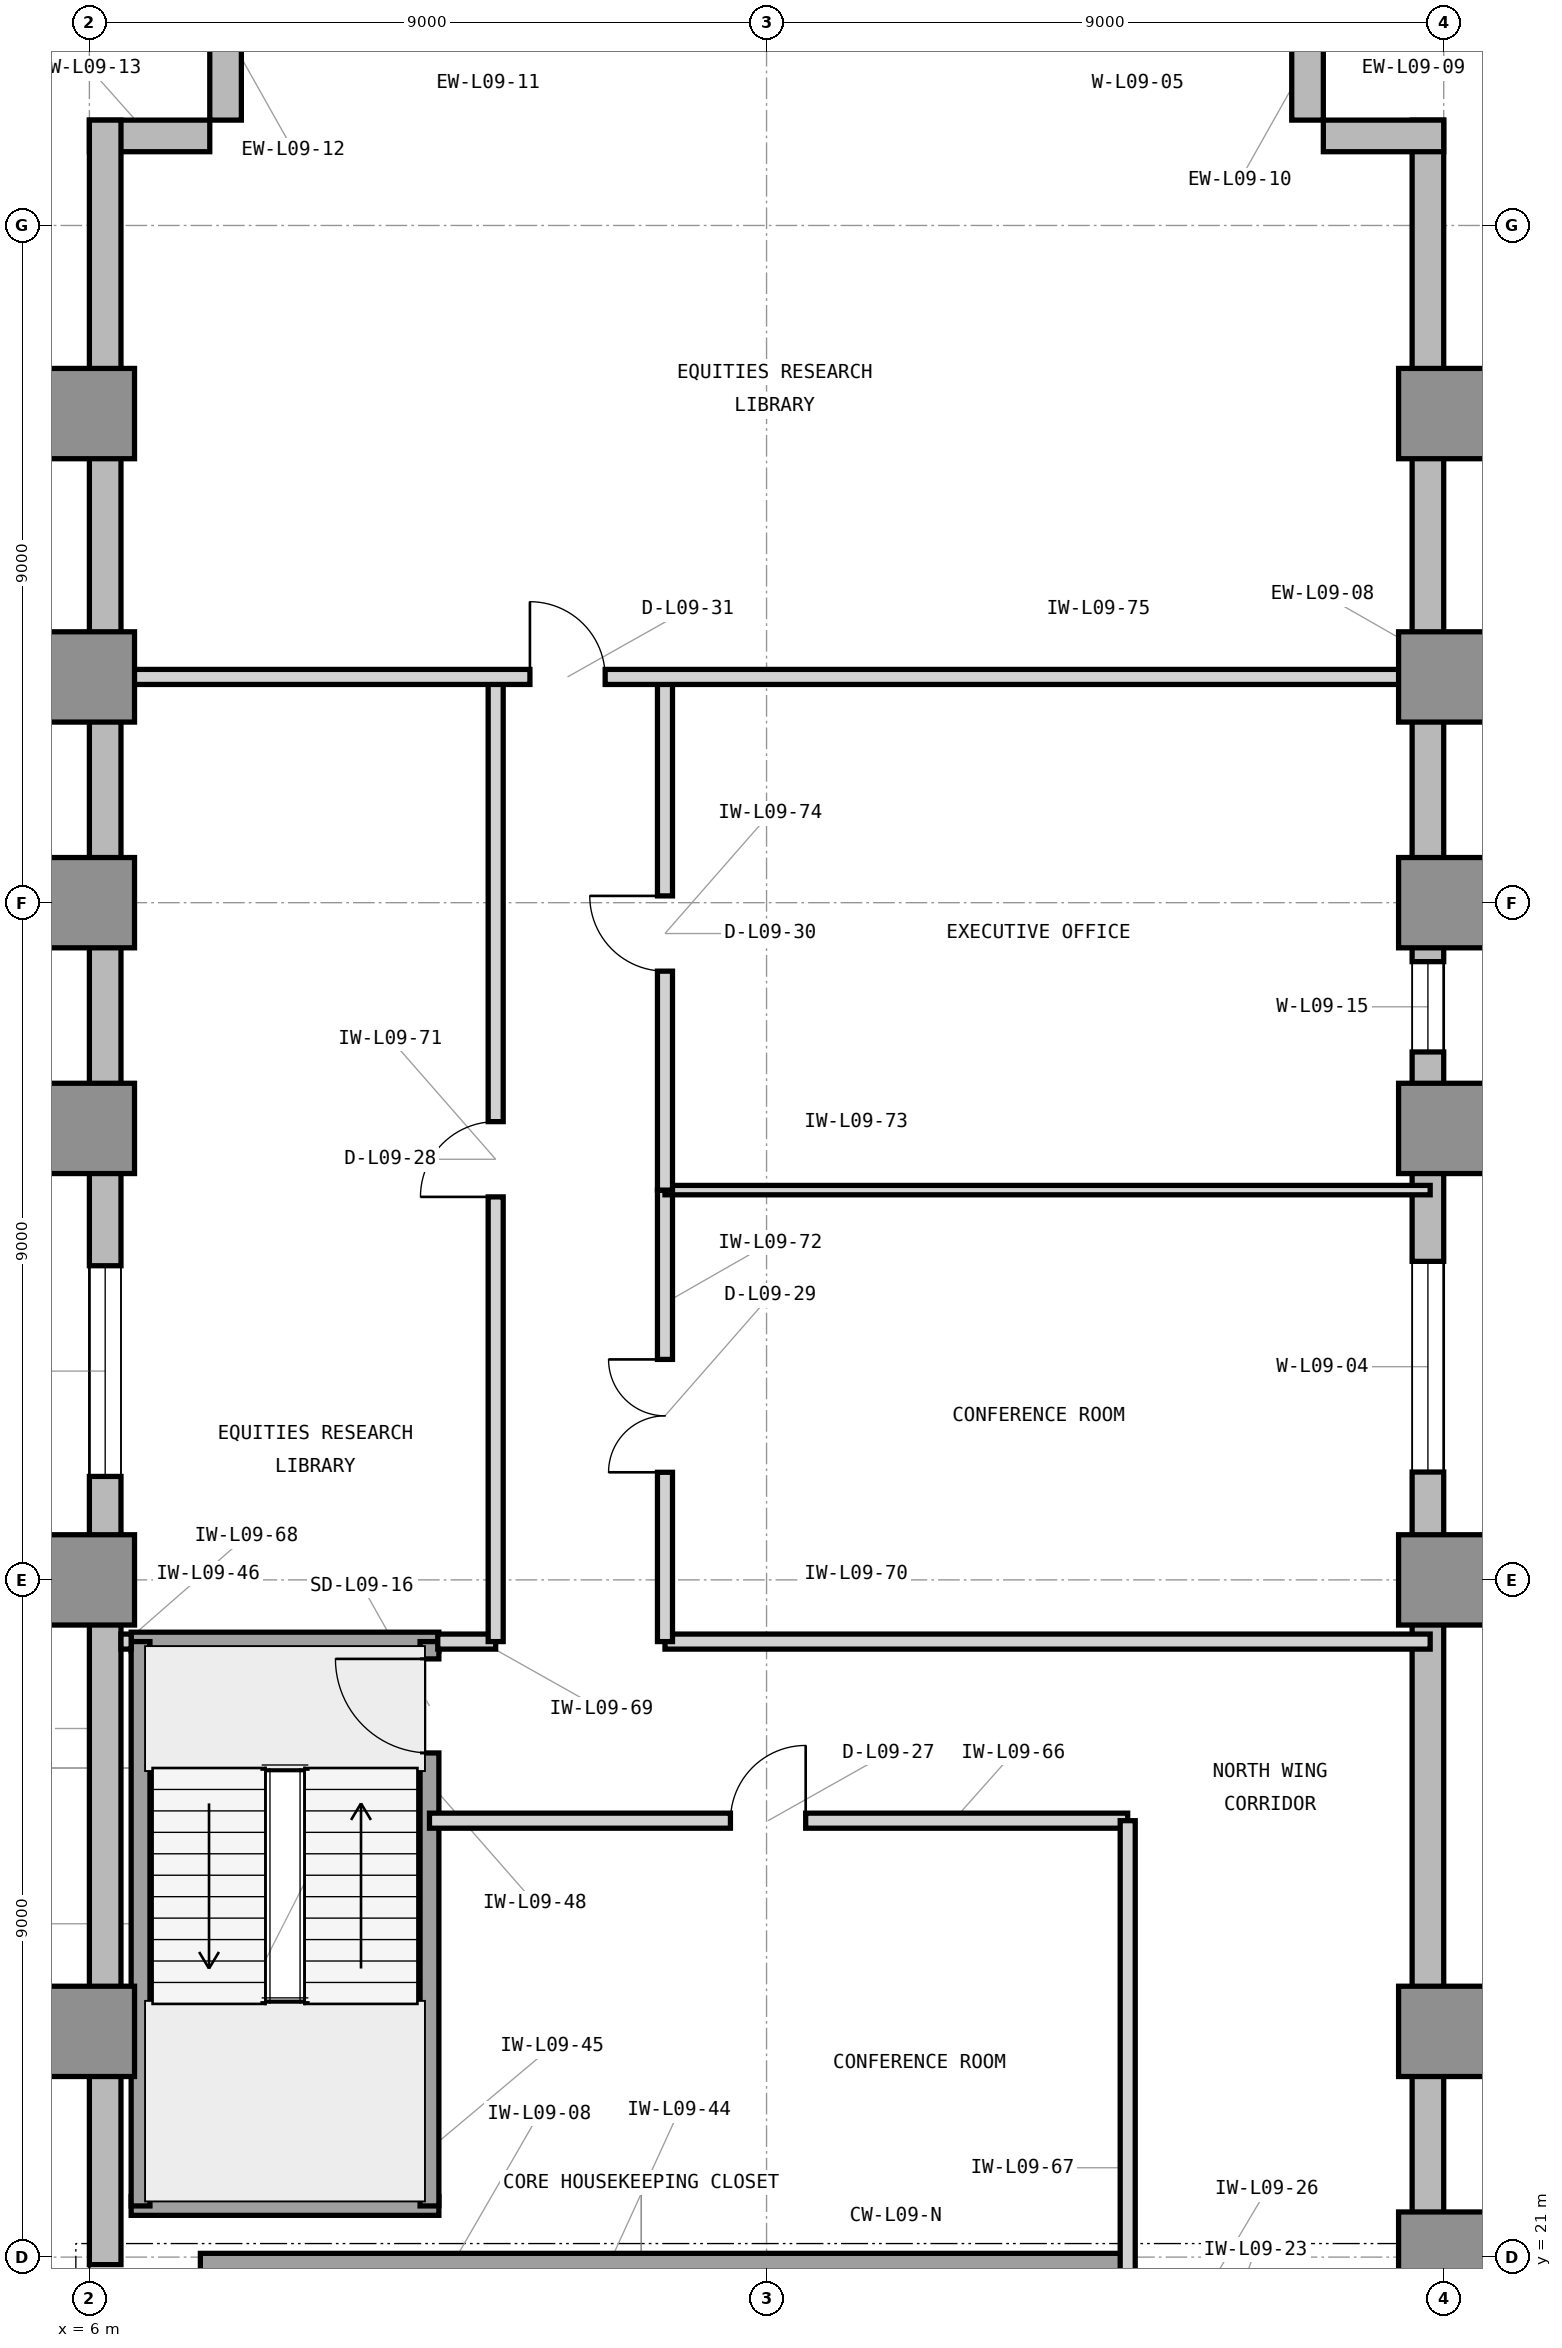
"""IFC4 building model, lengths in metres.
Left out: names, types, materials, properties, quantities, classifications, styles, units other than length and angle.
Written with IfcOpenShell. Run it as: python <this file> out.ifc"""

import sys

from ifc_helpers import new_model, si_unit, direction, frame, frame_2d, origin, origin_2d, place, context, subcontext, project, spatial, rectangle, extrude, element, fill, save


model = new_model("IFC4")
c1 = context("Model", 3, precision=1e-05, world=origin(), true_north=direction((0.0, 1.0)))
c2 = subcontext(c1, "Body", "Model", "MODEL_VIEW")
j1 = project(units=[si_unit("LENGTHUNIT", "METRE"), si_unit("PLANEANGLEUNIT", "RADIAN")], contexts=[c1])
p1 = place(None, origin())
s1 = spatial("IfcSite", under=j1, at=p1, CompositionType="ELEMENT")
p2 = place(p1, origin())
s2 = spatial("IfcBuilding", under=s1, at=p2, CompositionType="ELEMENT")
p3 = place(p2, frame((0.0, 0.0, 42.6)))
s3 = spatial("IfcBuildingStorey", under=s2, at=p3, CompositionType="ELEMENT", Elevation=42.6)
p4 = place(p3, frame((7.475, 20.65, 0.0), z_axis=(0.0, 0.0, 1.0), x_axis=(1.0, 0.0, 0.0)))
e1 = element("IfcWall", 1, at=p4, inside=s3, PredefinedType="SHEAR", context=c2, shape_type="SweptSolid", body=[
    extrude(rectangle(XDim=12.325, YDim=0.8, at=frame_2d((6.163, 0.0))), origin(), (0.0, 0.0, 1.0), 4.2),
])
for number, where, z_axis, x_axis in (
    (2, (24.0, 21.0, 0.0), (0.0, 0.0, 1.0), (1.0, 0.0, 0.0)),
    (3, (6.0, 24.0, 0.0), (0.0, 0.0, 1.0), (1.0, 0.0, 0.0)),
    (4, (24.0, 24.0, 0.0), (0.0, 0.0, 1.0), (1.0, 0.0, 0.0)),
    (5, (6.0, 30.0, 0.0), (0.0, 0.0, 1.0), (1.0, 0.0, 0.0)),
    (6, (24.0, 30.0, 0.0), (0.0, 0.0, 1.0), (1.0, 0.0, 0.0)),
    (7, (6.0, 36.0, 0.0), (0.0, 0.0, 1.0), (1.0, 0.0, 0.0)),
    (8, (24.0, 36.0, 0.0), (0.0, 0.0, 1.0), (1.0, 0.0, 0.0)),
    (9, (6.0, 39.0, 0.0), (0.0, 0.0, 1.0), (1.0, 0.0, 0.0)),
    (10, (24.0, 39.0, 0.0), (0.0, 0.0, 1.0), (1.0, 0.0, 0.0)),
    (11, (6.0, 42.0, 0.0), (0.0, 0.0, 1.0), (1.0, 0.0, 0.0)),
    (12, (24.0, 42.0, 0.0), (0.0, 0.0, 1.0), (1.0, 0.0, 0.0)),
    (13, (6.0, 45.5, 0.0), (0.0, 0.0, 1.0), (1.0, 0.0, 0.0)),
    (14, (24.0, 45.5, 0.0), (0.0, 0.0, 1.0), (1.0, 0.0, 0.0)),
):
    element("IfcColumn", number, at=place(p3, frame(where, z_axis=z_axis, x_axis=x_axis)), inside=s3, PredefinedType="COLUMN", context=c2, shape_type="SweptSolid", body=[
        extrude(rectangle(XDim=1.2, YDim=1.2, at=origin_2d()), origin(), (0.0, 0.0, 1.0), 4.2),
    ])
p5 = place(p3, frame((64.4, 20.79, 0.0), z_axis=(0.0, 0.0, 1.0), x_axis=(-1.0, 0.0, 0.0)))
e15 = element("IfcWall", 15, at=p5, inside=s3, PredefinedType="STANDARD", context=c2, shape_type="SweptSolid", body=[
    extrude(rectangle(XDim=40.4, YDim=0.42, at=frame_2d((20.2, 0.0))), origin(), (0.0, 0.0, 1.0), 3.98),
])
p6 = place(p5, frame((26.375, 0.0, 0.85)))
e16 = element("IfcOpeningElement", 16, at=p6, cuts=e15, PredefinedType="OPENING", context=c2, shape_type="SweptSolid", body=[
    extrude(rectangle(XDim=2.8, YDim=2.45, at=frame_2d((1.4, 1.225))), frame((0.0, 0.22, 0.0), z_axis=(0.0, -1.0, 0.0), x_axis=(1.0, 0.0, 0.0)), (0.0, 0.0, 1.0), 0.44),
])
p7 = place(p5, frame((38.222, 0.0, 0.85)))
e17 = element("IfcOpeningElement", 17, at=p7, cuts=e15, PredefinedType="OPENING", context=c2, shape_type="SweptSolid", body=[
    extrude(rectangle(XDim=1.2, YDim=2.45, at=frame_2d((0.6, 1.225))), frame((0.0, 0.22, 0.0), z_axis=(0.0, -1.0, 0.0), x_axis=(1.0, 0.0, 0.0)), (0.0, 0.0, 1.0), 0.44),
])
p8 = place(p5, frame((32.536, 0.0, 0.85)))
e18 = element("IfcOpeningElement", 18, at=p8, cuts=e15, PredefinedType="OPENING", context=c2, shape_type="SweptSolid", body=[
    extrude(rectangle(XDim=2.8, YDim=2.45, at=frame_2d((1.4, 1.225))), frame((0.0, 0.22, 0.0), z_axis=(0.0, -1.0, 0.0), x_axis=(1.0, 0.0, 0.0)), (0.0, 0.0, 1.0), 0.44),
])
p9 = place(p5, frame((17.386, 0.0, 0.85)))
e19 = element("IfcOpeningElement", 19, at=p9, cuts=e15, PredefinedType="OPENING", context=c2, shape_type="SweptSolid", body=[
    extrude(rectangle(XDim=2.8, YDim=2.45, at=frame_2d((1.4, 1.225))), frame((0.0, 0.22, 0.0), z_axis=(0.0, -1.0, 0.0), x_axis=(1.0, 0.0, 0.0)), (0.0, 0.0, 1.0), 0.44),
])
p10 = place(p3, frame((23.79, 21.0, 0.0), z_axis=(0.0, 0.0, 1.0), x_axis=(0.0, 1.0, 0.0)))
e20 = element("IfcWall", 20, at=p10, inside=s3, PredefinedType="STANDARD", context=c2, shape_type="SweptSolid", body=[
    extrude(rectangle(XDim=28.4, YDim=0.42, at=frame_2d((14.2, 0.0))), origin(), (0.0, 0.0, 1.0), 3.98),
])
p11 = place(p10, frame((10.433, 0.0, 0.85)))
e21 = element("IfcOpeningElement", 21, at=p11, cuts=e20, PredefinedType="OPENING", context=c2, shape_type="SweptSolid", body=[
    extrude(rectangle(XDim=2.8, YDim=2.45, at=frame_2d((1.4, 1.225))), frame((0.0, 0.22, 0.0), z_axis=(0.0, -1.0, 0.0), x_axis=(1.0, 0.0, 0.0)), (0.0, 0.0, 1.0), 0.44),
])
p12 = place(p10, frame((16.016, 0.0, 0.85)))
e22 = element("IfcOpeningElement", 22, at=p12, cuts=e20, PredefinedType="OPENING", context=c2, shape_type="SweptSolid", body=[
    extrude(rectangle(XDim=1.2, YDim=2.45, at=frame_2d((0.6, 1.225))), frame((0.0, 0.22, 0.0), z_axis=(0.0, -1.0, 0.0), x_axis=(1.0, 0.0, 0.0)), (0.0, 0.0, 1.0), 0.44),
])
for number, where, z_axis, x_axis in (
    (23, (24.0, 49.19, 0.0), (0.0, 0.0, 1.0), (-1.0, 0.0, 0.0)),
    (24, (22.19, 49.4, 0.0), (0.0, 0.0, 1.0), (0.0, 1.0, 0.0)),
    (25, (7.81, 51.0, 0.0), (0.0, 0.0, 1.0), (0.0, -1.0, 0.0)),
    (26, (7.6, 49.19, 0.0), (0.0, 0.0, 1.0), (-1.0, 0.0, 0.0)),
):
    element("IfcWall", number, at=place(p3, frame(where, z_axis=z_axis, x_axis=x_axis)), inside=s3, PredefinedType="STANDARD", context=c2, shape_type="SweptSolid", body=[
        extrude(rectangle(XDim=1.6, YDim=0.42, at=frame_2d((0.8, 0.0))), origin(), (0.0, 0.0, 1.0), 3.98),
    ])
p13 = place(p3, frame((6.21, 49.4, 0.0), z_axis=(0.0, 0.0, 1.0), x_axis=(0.0, -1.0, 0.0)))
e27 = element("IfcWall", 27, at=p13, inside=s3, PredefinedType="STANDARD", context=c2, shape_type="SweptSolid", body=[
    extrude(rectangle(XDim=28.5, YDim=0.42, at=frame_2d((14.25, 0.0))), origin(), (0.0, 0.0, 1.0), 3.98),
])
p14 = place(p13, frame((15.225, 0.0, 0.85)))
e28 = element("IfcOpeningElement", 28, at=p14, cuts=e27, PredefinedType="OPENING", context=c2, shape_type="SweptSolid", body=[
    extrude(rectangle(XDim=2.8, YDim=2.45, at=frame_2d((1.4, 1.225))), frame((0.0, 0.22, 0.0), z_axis=(0.0, -1.0, 0.0), x_axis=(1.0, 0.0, 0.0)), (0.0, 0.0, 1.0), 0.44),
])
for number, where, z_axis, x_axis in (
    (29, (6.555, 21.68, 0.0), (0.0, 0.0, 1.0), (1.0, 0.0, 0.0)),
    (30, (6.555, 29.18, 0.0), (0.0, 0.0, 1.0), (1.0, 0.0, 0.0)),
):
    element("IfcWall", number, at=place(p3, frame(where, z_axis=z_axis, x_axis=x_axis)), inside=s3, PredefinedType="SHEAR", context=c2, shape_type="SweptSolid", body=[
        extrude(rectangle(XDim=4.09, YDim=0.25, at=frame_2d((2.045, 0.0))), origin(), (0.0, 0.0, 1.0), 4.2),
    ])
p15 = place(p3, frame((6.68, 21.68, 0.0), z_axis=(0.0, 0.0, 1.0), x_axis=(0.0, 1.0, 0.0)))
e31 = element("IfcWall", 31, at=p15, inside=s3, PredefinedType="SHEAR", context=c2, shape_type="SweptSolid", body=[
    extrude(rectangle(XDim=7.5, YDim=0.25, at=frame_2d((3.75, 0.0))), origin(), (0.0, 0.0, 1.0), 4.2),
])
p16 = place(p3, frame((10.52, 21.68, 0.0), z_axis=(0.0, 0.0, 1.0), x_axis=(0.0, 1.0, 0.0)))
e32 = element("IfcWall", 32, at=p16, inside=s3, PredefinedType="SHEAR", context=c2, shape_type="SweptSolid", body=[
    extrude(rectangle(XDim=7.5, YDim=0.25, at=frame_2d((3.75, 0.0))), origin(), (0.0, 0.0, 1.0), 4.2),
])
p17 = place(p16, frame((6.02, 0.0, 0.0)))
e33 = element("IfcOpeningElement", 33, at=p17, cuts=e32, PredefinedType="OPENING", context=c2, shape_type="SweptSolid", body=[
    extrude(rectangle(XDim=1.25, YDim=2.2, at=frame_2d((0.625, 1.1))), frame((0.0, 0.135, 0.0), z_axis=(0.0, -1.0, 0.0), x_axis=(1.0, 0.0, 0.0)), (0.0, 0.0, 1.0), 0.27),
])
p18 = place(p3, frame((10.52, 26.8, 0.0), z_axis=(0.0, 0.0, 1.0), x_axis=(1.0, 0.0, 0.0)))
e34 = element("IfcWall", 34, at=p18, inside=s3, PredefinedType="PARTITIONING", context=c2, shape_type="SweptSolid", body=[
    extrude(rectangle(XDim=9.28, YDim=0.2, at=frame_2d((4.64, 0.0))), origin(), (0.0, 0.0, 1.0), 3.97),
])
p19 = place(p18, frame((4.0, 0.0, 0.0)))
e35 = element("IfcOpeningElement", 35, at=p19, cuts=e34, PredefinedType="OPENING", context=c2, shape_type="SweptSolid", body=[
    extrude(rectangle(XDim=1.0, YDim=2.15, at=frame_2d((0.5, 1.075))), frame((0.0, 0.11, 0.0), z_axis=(0.0, -1.0, 0.0), x_axis=(1.0, 0.0, 0.0)), (0.0, 0.0, 1.0), 0.22),
])
p20 = place(p3, frame((19.8, 20.65, 0.0), z_axis=(0.0, 0.0, 1.0), x_axis=(0.0, 1.0, 0.0)))
e36 = element("IfcWall", 36, at=p20, inside=s3, PredefinedType="PARTITIONING", context=c2, shape_type="SweptSolid", body=[
    extrude(rectangle(XDim=6.15, YDim=0.2, at=frame_2d((3.075, 0.0))), origin(), (0.0, 0.0, 1.0), 3.97),
])
p21 = place(p3, frame((6.42, 29.18, 0.0), z_axis=(0.0, 0.0, 1.0), x_axis=(1.0, 0.0, 0.0)))
e37 = element("IfcWall", 37, at=p21, inside=s3, PredefinedType="PARTITIONING", context=c2, shape_type="SweptSolid", body=[
    extrude(rectangle(XDim=0.135, YDim=0.2, at=frame_2d((0.067, 0.0))), origin(), (0.0, 0.0, 1.0), 3.97),
])
p22 = place(p3, frame((10.63, 29.18, 0.0), z_axis=(0.0, 0.0, 1.0), x_axis=(1.0, 0.0, 0.0)))
e38 = element("IfcWall", 38, at=p22, inside=s3, PredefinedType="PARTITIONING", context=c2, shape_type="SweptSolid", body=[
    extrude(rectangle(XDim=0.77, YDim=0.2, at=frame_2d((0.385, 0.0))), origin(), (0.0, 0.0, 1.0), 3.97),
])
p23 = place(p3, frame((13.65, 29.18, 0.0), z_axis=(0.0, 0.0, 1.0), x_axis=(1.0, 0.0, 0.0)))
e39 = element("IfcWall", 39, at=p23, inside=s3, PredefinedType="PARTITIONING", context=c2, shape_type="SweptSolid", body=[
    extrude(rectangle(XDim=10.17, YDim=0.2, at=frame_2d((5.085, 0.0))), origin(), (0.0, 0.0, 1.0), 3.97),
])
p24 = place(p3, frame((11.4, 29.18, 0.0), z_axis=(0.0, 0.0, 1.0), x_axis=(0.0, 1.0, 0.0)))
e40 = element("IfcWall", 40, at=p24, inside=s3, PredefinedType="PARTITIONING", context=c2, shape_type="SweptSolid", body=[
    extrude(rectangle(XDim=12.82, YDim=0.2, at=frame_2d((6.41, 0.0))), origin(), (0.0, 0.0, 1.0), 3.97),
])
p25 = place(p24, frame((5.91, 0.0, 0.0)))
e41 = element("IfcOpeningElement", 41, at=p25, cuts=e40, PredefinedType="OPENING", context=c2, shape_type="SweptSolid", body=[
    extrude(rectangle(XDim=1.0, YDim=2.15, at=frame_2d((0.5, 1.075))), frame((0.0, 0.11, 0.0), z_axis=(0.0, -1.0, 0.0), x_axis=(1.0, 0.0, 0.0)), (0.0, 0.0, 1.0), 0.22),
])
p26 = place(p3, frame((13.65, 29.18, 0.0), z_axis=(0.0, 0.0, 1.0), x_axis=(0.0, 1.0, 0.0)))
e42 = element("IfcWall", 42, at=p26, inside=s3, PredefinedType="PARTITIONING", context=c2, shape_type="SweptSolid", body=[
    extrude(rectangle(XDim=6.0, YDim=0.2, at=frame_2d((3.0, 0.0))), origin(), (0.0, 0.0, 1.0), 3.97),
])
p27 = place(p26, frame((2.25, 0.0, 0.0)))
e43 = element("IfcOpeningElement", 43, at=p27, cuts=e42, PredefinedType="OPENING", context=c2, shape_type="SweptSolid", body=[
    extrude(rectangle(XDim=1.5, YDim=2.3, at=frame_2d((0.75, 1.15))), frame((0.0, 0.11, 0.0), z_axis=(0.0, -1.0, 0.0), x_axis=(1.0, 0.0, 0.0)), (0.0, 0.0, 1.0), 0.22),
])
p28 = place(p3, frame((13.65, 35.18, 0.0), z_axis=(0.0, 0.0, 1.0), x_axis=(1.0, 0.0, 0.0)))
e44 = element("IfcWall", 44, at=p28, inside=s3, PredefinedType="PARTITIONING", context=c2, shape_type="SweptSolid", body=[
    extrude(rectangle(XDim=10.17, YDim=0.125, at=frame_2d((5.085, 0.0))), origin(), (0.0, 0.0, 1.0), 3.97),
])
p29 = place(p3, frame((13.65, 35.18, 0.0), z_axis=(0.0, 0.0, 1.0), x_axis=(0.0, 1.0, 0.0)))
e45 = element("IfcWall", 45, at=p29, inside=s3, PredefinedType="PARTITIONING", context=c2, shape_type="SweptSolid", body=[
    extrude(rectangle(XDim=6.82, YDim=0.2, at=frame_2d((3.41, 0.0))), origin(), (0.0, 0.0, 1.0), 3.97),
])
p30 = place(p29, frame((2.91, 0.0, 0.0)))
e46 = element("IfcOpeningElement", 46, at=p30, cuts=e45, PredefinedType="OPENING", context=c2, shape_type="SweptSolid", body=[
    extrude(rectangle(XDim=1.0, YDim=2.15, at=frame_2d((0.5, 1.075))), frame((0.0, 0.11, 0.0), z_axis=(0.0, -1.0, 0.0), x_axis=(1.0, 0.0, 0.0)), (0.0, 0.0, 1.0), 0.22),
])
p31 = place(p3, frame((6.18, 42.0, 0.0), z_axis=(0.0, 0.0, 1.0), x_axis=(1.0, 0.0, 0.0)))
e47 = element("IfcWall", 47, at=p31, inside=s3, PredefinedType="PARTITIONING", context=c2, shape_type="SweptSolid", body=[
    extrude(rectangle(XDim=17.64, YDim=0.2, at=frame_2d((8.82, 0.0))), origin(), (0.0, 0.0, 1.0), 3.114),
])
p32 = place(p31, frame((5.675, 0.0, 0.0)))
e48 = element("IfcOpeningElement", 48, at=p32, cuts=e47, PredefinedType="OPENING", context=c2, shape_type="SweptSolid", body=[
    extrude(rectangle(XDim=1.0, YDim=2.15, at=frame_2d((0.5, 1.075))), frame((0.0, 0.11, 0.0), z_axis=(0.0, -1.0, 0.0), x_axis=(1.0, 0.0, 0.0)), (0.0, 0.0, 1.0), 0.22),
])
p33 = place(p11, origin())
e49 = element("IfcWindow", 49, at=p33, inside=s3, PartitioningType="SINGLE_PANEL", PredefinedType="WINDOW", context=c2, shape_type="SweptSolid", body=[
    extrude(rectangle(XDim=2.8, YDim=2.45, at=frame_2d((1.4, 1.225))), frame((0.0, 0.11, 0.0), z_axis=(0.0, -1.0, 0.0), x_axis=(1.0, 0.0, 0.0)), (0.0, 0.0, 1.0), 0.06),
])
fill(e21, e49)
p34 = place(p14, origin())
e50 = element("IfcWindow", 50, at=p34, inside=s3, PartitioningType="SINGLE_PANEL", PredefinedType="WINDOW", context=c2, shape_type="SweptSolid", body=[
    extrude(rectangle(XDim=2.8, YDim=2.45, at=frame_2d((1.4, 1.225))), frame((0.0, 0.11, 0.0), z_axis=(0.0, -1.0, 0.0), x_axis=(1.0, 0.0, 0.0)), (0.0, 0.0, 1.0), 0.06),
])
fill(e28, e50)
p35 = place(p17, origin())
e51 = element("IfcDoor", 51, at=p35, inside=s3, OperationType="SINGLE_SWING_RIGHT", PredefinedType="DOOR", context=c2, shape_type="SweptSolid", body=[
    extrude(rectangle(XDim=1.25, YDim=2.2, at=frame_2d((0.625, 1.1))), frame((0.0, 0.025, 0.0), z_axis=(0.0, -1.0, 0.0), x_axis=(1.0, 0.0, 0.0)), (0.0, 0.0, 1.0), 0.05),
])
fill(e33, e51)
p36 = place(p19, origin())
e52 = element("IfcDoor", 52, at=p36, inside=s3, OperationType="SINGLE_SWING_RIGHT", PredefinedType="DOOR", context=c2, shape_type="SweptSolid", body=[
    extrude(rectangle(XDim=1.0, YDim=2.15, at=frame_2d((0.5, 1.075))), frame((0.0, 0.025, 0.0), z_axis=(0.0, -1.0, 0.0), x_axis=(1.0, 0.0, 0.0)), (0.0, 0.0, 1.0), 0.05),
])
fill(e35, e52)
p37 = place(p25, origin())
e53 = element("IfcDoor", 53, at=p37, inside=s3, OperationType="SINGLE_SWING_LEFT", PredefinedType="DOOR", context=c2, shape_type="SweptSolid", body=[
    extrude(rectangle(XDim=1.0, YDim=2.15, at=frame_2d((0.5, 1.075))), frame((0.0, 0.025, 0.0), z_axis=(0.0, -1.0, 0.0), x_axis=(1.0, 0.0, 0.0)), (0.0, 0.0, 1.0), 0.05),
])
fill(e41, e53)
p38 = place(p27, origin())
e54 = element("IfcDoor", 54, at=p38, inside=s3, OperationType="DOUBLE_DOOR_SINGLE_SWING", PredefinedType="DOOR", context=c2, shape_type="SweptSolid", body=[
    extrude(rectangle(XDim=1.5, YDim=2.3, at=frame_2d((0.75, 1.15))), frame((0.0, 0.025, 0.0), z_axis=(0.0, -1.0, 0.0), x_axis=(1.0, 0.0, 0.0)), (0.0, 0.0, 1.0), 0.05),
])
fill(e43, e54)
p39 = place(p30, origin())
e55 = element("IfcDoor", 55, at=p39, inside=s3, OperationType="SINGLE_SWING_RIGHT", PredefinedType="DOOR", context=c2, shape_type="SweptSolid", body=[
    extrude(rectangle(XDim=1.0, YDim=2.15, at=frame_2d((0.5, 1.075))), frame((0.0, 0.025, 0.0), z_axis=(0.0, -1.0, 0.0), x_axis=(1.0, 0.0, 0.0)), (0.0, 0.0, 1.0), 0.05),
])
fill(e46, e55)
p40 = place(p32, origin())
e56 = element("IfcDoor", 56, at=p40, inside=s3, OperationType="SINGLE_SWING_LEFT", PredefinedType="DOOR", context=c2, shape_type="SweptSolid", body=[
    extrude(rectangle(XDim=1.0, YDim=2.15, at=frame_2d((0.5, 1.075))), frame((0.0, 0.025, 0.0), z_axis=(0.0, -1.0, 0.0), x_axis=(1.0, 0.0, 0.0)), (0.0, 0.0, 1.0), 0.05),
])
fill(e48, e56)
p41 = place(p12, origin())
e57 = element("IfcWindow", 57, at=p41, inside=s3, PartitioningType="SINGLE_PANEL", PredefinedType="WINDOW", context=c2, shape_type="SweptSolid", body=[
    extrude(rectangle(XDim=1.2, YDim=2.45, at=frame_2d((0.6, 1.225))), frame((0.0, 0.11, 0.0), z_axis=(0.0, -1.0, 0.0), x_axis=(1.0, 0.0, 0.0)), (0.0, 0.0, 1.0), 0.06),
])
fill(e22, e57)
save(model, sys.argv[1])
